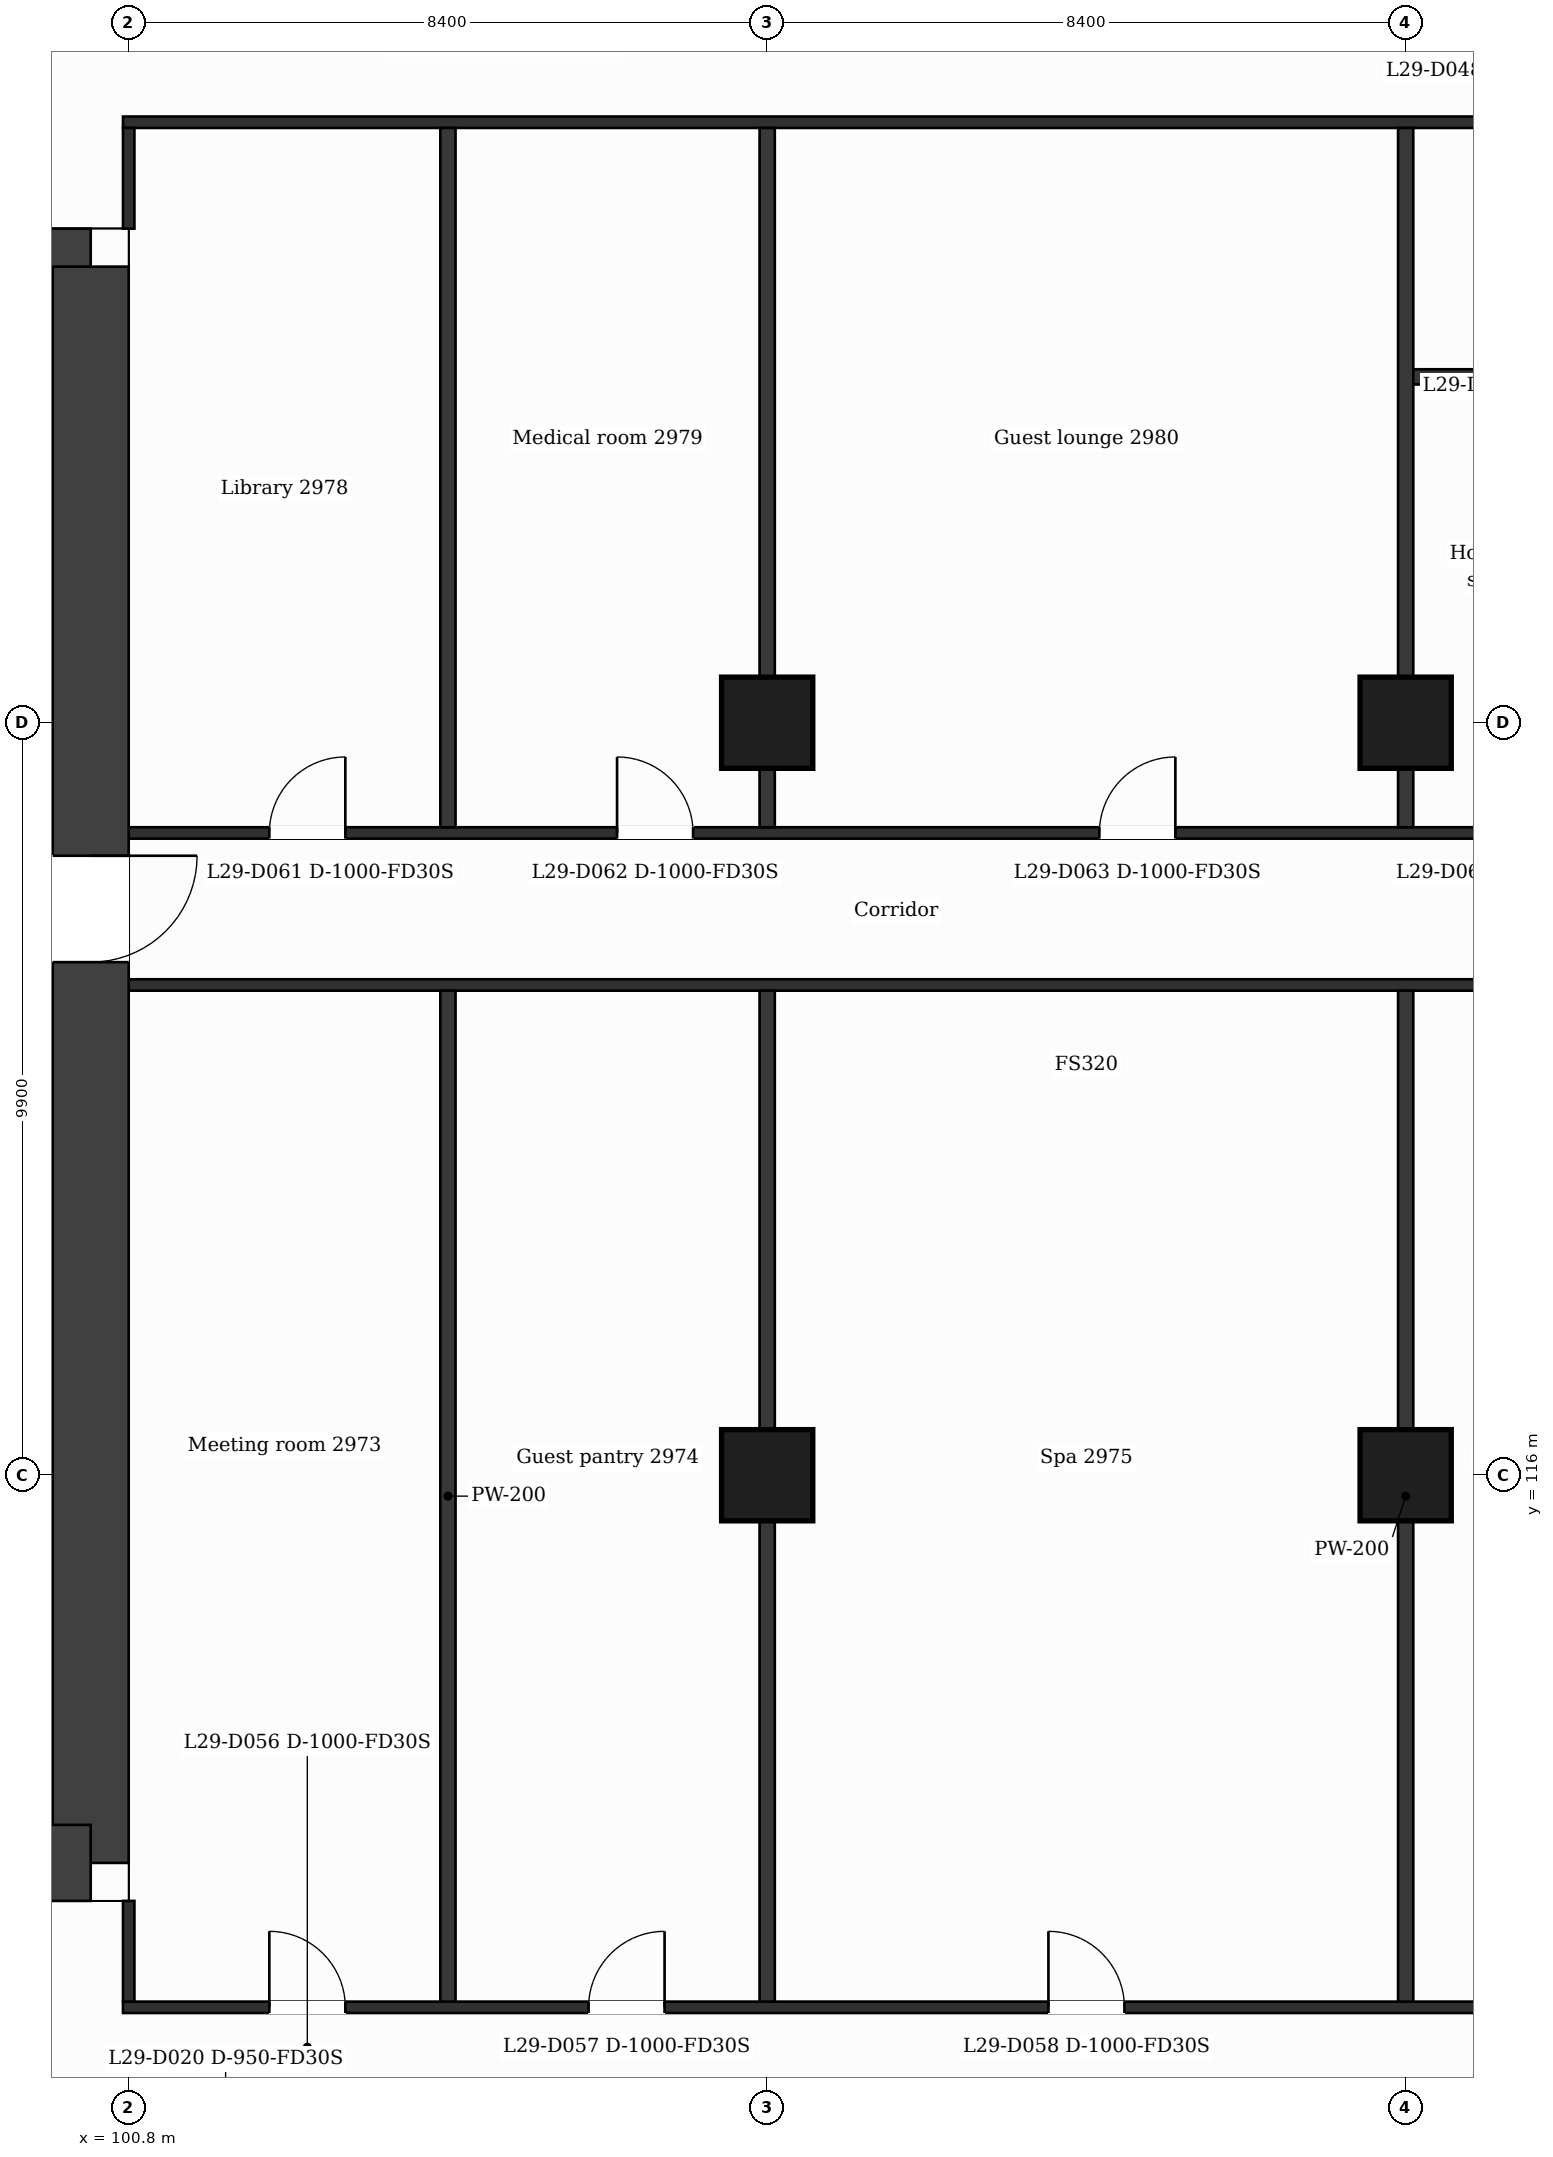
"""IFC4 building model, lengths in metres.
Left out: names, types, materials, properties, quantities, classifications, styles, units other than length and angle.
Written with IfcOpenShell. Run it as: python <this file> out.ifc"""

import sys

from ifc_helpers import new_model, si_unit, direction, frame, frame_2d, origin, origin_2d, place, context, subcontext, project, spatial, rectangle, extrude, element, fill, save


model = new_model("IFC4")
c1 = context("Model", 3, precision=1e-05, world=origin(), true_north=direction((0.0, 1.0)))
c2 = subcontext(c1, "Body", "Model", "MODEL_VIEW")
j1 = project(units=[si_unit("LENGTHUNIT", "METRE"), si_unit("PLANEANGLEUNIT", "RADIAN")], contexts=[c1])
p1 = place(None, origin())
s1 = spatial("IfcSite", under=j1, at=p1, CompositionType="ELEMENT")
p2 = place(p1, origin())
s2 = spatial("IfcBuilding", under=s1, at=p2, CompositionType="ELEMENT")
p3 = place(p2, frame((0.0, 0.0, 124.3)))
s3 = spatial("IfcBuildingStorey", under=s2, at=p3, CompositionType="ELEMENT", Elevation=124.3)
p4 = place(p3, frame((89.068, 131.9, 0.0), z_axis=(0.0, 0.0, 1.0), x_axis=(1.0, 0.0, 0.0)))
e1 = element("IfcWall", 1, at=p4, inside=s3, PredefinedType="SHEAR", context=c2, shape_type="SweptSolid", body=[
    extrude(rectangle(XDim=11.232, YDim=1.0, at=frame_2d((5.616, 0.0))), origin(), (0.0, 0.0, 1.0), 3.7),
])
p5 = place(p4, frame((6.646, 0.0, 0.0)))
e2 = element("IfcOpeningElement", 2, at=p5, cuts=e1, PredefinedType="OPENING", context=c2, shape_type="SweptSolid", body=[
    extrude(rectangle(XDim=1.2, YDim=2.1, at=frame_2d((0.6, 1.05))), frame((0.0, 0.51, 0.0), z_axis=(0.0, -1.0, 0.0), x_axis=(1.0, 0.0, 0.0)), (0.0, 0.0, 1.0), 1.02),
])
p6 = place(p3, frame((100.3, 131.9, 0.0), z_axis=(0.0, 0.0, 1.0), x_axis=(0.0, -1.0, 0.0)))
e3 = element("IfcWall", 3, at=p6, inside=s3, PredefinedType="SHEAR", context=c2, shape_type="SweptSolid", body=[
    extrude(rectangle(XDim=21.0, YDim=1.0, at=frame_2d((10.5, 0.0))), origin(), (0.0, 0.0, 1.0), 3.7),
])
p7 = place(p6, frame((7.75, 0.0, 0.0)))
e4 = element("IfcOpeningElement", 4, at=p7, cuts=e3, PredefinedType="OPENING", context=c2, shape_type="SweptSolid", body=[
    extrude(rectangle(XDim=1.4, YDim=2.1, at=frame_2d((0.7, 1.05))), frame((0.0, 0.51, 0.0), z_axis=(0.0, -1.0, 0.0), x_axis=(1.0, 0.0, 0.0)), (0.0, 0.0, 1.0), 1.02),
])
p8 = place(p3, frame((100.3, 110.9, 0.0), z_axis=(0.0, 0.0, 1.0), x_axis=(-1.0, 0.0, 0.0)))
e5 = element("IfcWall", 5, at=p8, inside=s3, PredefinedType="SHEAR", context=c2, shape_type="SweptSolid", body=[
    extrude(rectangle(XDim=14.059, YDim=1.0, at=frame_2d((7.03, 0.0))), origin(), (0.0, 0.0, 1.0), 3.7),
])
p9 = place(p8, frame((5.802, 0.0, 0.0)))
e6 = element("IfcOpeningElement", 6, at=p9, cuts=e5, PredefinedType="OPENING", context=c2, shape_type="SweptSolid", body=[
    extrude(rectangle(XDim=1.4, YDim=2.1, at=frame_2d((0.7, 1.05))), frame((0.0, 0.51, 0.0), z_axis=(0.0, -1.0, 0.0), x_axis=(1.0, 0.0, 0.0)), (0.0, 0.0, 1.0), 1.02),
])
p10 = place(p3, frame((94.9, 116.5, 0.0), z_axis=(0.0, 0.0, 1.0), x_axis=(1.0, 0.0, 0.0)))
e7 = element("IfcWall", 7, at=p10, inside=s3, PredefinedType="SHEAR", context=c2, shape_type="SweptSolid", body=[
    extrude(rectangle(XDim=4.9, YDim=1.0, at=frame_2d((2.45, 0.0))), origin(), (0.0, 0.0, 1.0), 3.7),
])
for number, where, z_axis, x_axis in (
    (8, (109.2, 116.0, 0.0), (0.0, 0.0, 1.0), (1.0, 0.0, 0.0)),
    (9, (117.6, 116.0, 0.0), (0.0, 0.0, 1.0), (1.0, 0.0, 0.0)),
    (10, (109.2, 125.9, 0.0), (0.0, 0.0, 1.0), (1.0, 0.0, 0.0)),
    (11, (117.6, 125.9, 0.0), (0.0, 0.0, 1.0), (1.0, 0.0, 0.0)),
):
    element("IfcColumn", number, at=place(p3, frame(where, z_axis=z_axis, x_axis=x_axis)), inside=s3, PredefinedType="COLUMN", context=c2, shape_type="SweptSolid", body=[
        extrude(rectangle(XDim=1.2, YDim=1.2, at=origin_2d()), origin(), (0.0, 0.0, 1.0), 3.7),
    ])
p11 = place(p3, frame((100.725, 109.0, 0.0), z_axis=(0.0, 0.0, 1.0), x_axis=(1.0, 0.0, 0.0)))
e12 = element("IfcWall", 12, at=p11, inside=s3, PredefinedType="PARTITIONING", context=c2, shape_type="SweptSolid", body=[
    extrude(rectangle(XDim=25.35, YDim=0.15, at=frame_2d((12.675, 0.0))), origin(), (0.0, 0.0, 1.0), 3.38),
])
p12 = place(p11, frame((1.925, 0.0, 0.0)))
e13 = element("IfcOpeningElement", 13, at=p12, cuts=e12, PredefinedType="OPENING", context=c2, shape_type="SweptSolid", body=[
    extrude(rectangle(XDim=1.0, YDim=2.1, at=frame_2d((0.5, 1.05))), frame((0.0, 0.085, 0.0), z_axis=(0.0, -1.0, 0.0), x_axis=(1.0, 0.0, 0.0)), (0.0, 0.0, 1.0), 0.17),
])
p13 = place(p11, frame((6.125, 0.0, 0.0)))
e14 = element("IfcOpeningElement", 14, at=p13, cuts=e12, PredefinedType="OPENING", context=c2, shape_type="SweptSolid", body=[
    extrude(rectangle(XDim=1.0, YDim=2.1, at=frame_2d((0.5, 1.05))), frame((0.0, 0.085, 0.0), z_axis=(0.0, -1.0, 0.0), x_axis=(1.0, 0.0, 0.0)), (0.0, 0.0, 1.0), 0.17),
])
p14 = place(p11, frame((12.175, 0.0, 0.0)))
e15 = element("IfcOpeningElement", 15, at=p14, cuts=e12, PredefinedType="OPENING", context=c2, shape_type="SweptSolid", body=[
    extrude(rectangle(XDim=1.0, YDim=2.1, at=frame_2d((0.5, 1.05))), frame((0.0, 0.085, 0.0), z_axis=(0.0, -1.0, 0.0), x_axis=(1.0, 0.0, 0.0)), (0.0, 0.0, 1.0), 0.17),
])
p15 = place(p11, frame((19.1, 0.0, 0.0)))
e16 = element("IfcOpeningElement", 16, at=p15, cuts=e12, PredefinedType="OPENING", context=c2, shape_type="SweptSolid", body=[
    extrude(rectangle(XDim=1.0, YDim=2.1, at=frame_2d((0.5, 1.05))), frame((0.0, 0.085, 0.0), z_axis=(0.0, -1.0, 0.0), x_axis=(1.0, 0.0, 0.0)), (0.0, 0.0, 1.0), 0.17),
])
p16 = place(p11, frame((22.05, 0.0, 0.0)))
e17 = element("IfcOpeningElement", 17, at=p16, cuts=e12, PredefinedType="OPENING", context=c2, shape_type="SweptSolid", body=[
    extrude(rectangle(XDim=1.0, YDim=2.1, at=frame_2d((0.5, 1.05))), frame((0.0, 0.085, 0.0), z_axis=(0.0, -1.0, 0.0), x_axis=(1.0, 0.0, 0.0)), (0.0, 0.0, 1.0), 0.17),
])
for number, where, z_axis, x_axis in (
    (18, (95.227, 117.2, 0.0), (0.0, 0.0, 1.0), (1.0, 0.0, 0.0)),
    (19, (95.227, 118.8, 0.0), (0.0, 0.0, 1.0), (1.0, 0.0, 0.0)),
):
    element("IfcWall", number, at=place(p3, frame(where, z_axis=z_axis, x_axis=x_axis)), inside=s3, PredefinedType="PARTITIONING", context=c2, shape_type="SweptSolid", body=[
        extrude(rectangle(XDim=4.573, YDim=0.2, at=frame_2d((2.287, 0.0))), origin(), (0.0, 0.0, 1.0), 3.38),
    ])
p17 = place(p3, frame((95.227, 122.1, 0.0), z_axis=(0.0, 0.0, 1.0), x_axis=(1.0, 0.0, 0.0)))
e20 = element("IfcWall", 20, at=p17, inside=s3, PredefinedType="PARTITIONING", context=c2, shape_type="SweptSolid", body=[
    extrude(rectangle(XDim=4.573, YDim=0.2, at=frame_2d((2.287, 0.0))), origin(), (0.0, 0.0, 1.0), 3.38),
])
p18 = place(p17, frame((2.134, 0.0, 0.0)))
e21 = element("IfcOpeningElement", 21, at=p18, cuts=e20, PredefinedType="OPENING", context=c2, shape_type="SweptSolid", body=[
    extrude(rectangle(XDim=0.9, YDim=2.1, at=frame_2d((0.45, 1.05))), frame((0.0, 0.11, 0.0), z_axis=(0.0, -1.0, 0.0), x_axis=(1.0, 0.0, 0.0)), (0.0, 0.0, 1.0), 0.22),
])
p19 = place(p3, frame((100.8, 122.45, 0.0), z_axis=(0.0, 0.0, 1.0), x_axis=(1.0, 0.0, 0.0)))
e22 = element("IfcWall", 22, at=p19, inside=s3, PredefinedType="PARTITIONING", context=c2, shape_type="SweptSolid", body=[
    extrude(rectangle(XDim=25.2, YDim=0.15, at=frame_2d((12.6, 0.0))), origin(), (0.0, 0.0, 1.0), 3.38),
])
p20 = place(p3, frame((100.8, 124.45, 0.0), z_axis=(0.0, 0.0, 1.0), x_axis=(1.0, 0.0, 0.0)))
e23 = element("IfcWall", 23, at=p20, inside=s3, PredefinedType="PARTITIONING", context=c2, shape_type="SweptSolid", body=[
    extrude(rectangle(XDim=25.2, YDim=0.15, at=frame_2d((12.6, 0.0))), origin(), (0.0, 0.0, 1.0), 3.38),
])
p21 = place(p20, frame((1.85, 0.0, 0.0)))
e24 = element("IfcOpeningElement", 24, at=p21, cuts=e23, PredefinedType="OPENING", context=c2, shape_type="SweptSolid", body=[
    extrude(rectangle(XDim=1.0, YDim=2.1, at=frame_2d((0.5, 1.05))), frame((0.0, 0.085, 0.0), z_axis=(0.0, -1.0, 0.0), x_axis=(1.0, 0.0, 0.0)), (0.0, 0.0, 1.0), 0.17),
])
p22 = place(p20, frame((6.425, 0.0, 0.0)))
e25 = element("IfcOpeningElement", 25, at=p22, cuts=e23, PredefinedType="OPENING", context=c2, shape_type="SweptSolid", body=[
    extrude(rectangle(XDim=1.0, YDim=2.1, at=frame_2d((0.5, 1.05))), frame((0.0, 0.085, 0.0), z_axis=(0.0, -1.0, 0.0), x_axis=(1.0, 0.0, 0.0)), (0.0, 0.0, 1.0), 0.17),
])
p23 = place(p20, frame((12.77, 0.0, 0.0)))
e26 = element("IfcOpeningElement", 26, at=p23, cuts=e23, PredefinedType="OPENING", context=c2, shape_type="SweptSolid", body=[
    extrude(rectangle(XDim=1.0, YDim=2.1, at=frame_2d((0.5, 1.05))), frame((0.0, 0.085, 0.0), z_axis=(0.0, -1.0, 0.0), x_axis=(1.0, 0.0, 0.0)), (0.0, 0.0, 1.0), 0.17),
])
p24 = place(p20, frame((17.8, 0.0, 0.0)))
e27 = element("IfcOpeningElement", 27, at=p24, cuts=e23, PredefinedType="OPENING", context=c2, shape_type="SweptSolid", body=[
    extrude(rectangle(XDim=1.0, YDim=2.1, at=frame_2d((0.5, 1.05))), frame((0.0, 0.085, 0.0), z_axis=(0.0, -1.0, 0.0), x_axis=(1.0, 0.0, 0.0)), (0.0, 0.0, 1.0), 0.17),
])
p25 = place(p20, frame((22.85, 0.0, 0.0)))
e28 = element("IfcOpeningElement", 28, at=p25, cuts=e23, PredefinedType="OPENING", context=c2, shape_type="SweptSolid", body=[
    extrude(rectangle(XDim=1.0, YDim=2.1, at=frame_2d((0.5, 1.05))), frame((0.0, 0.085, 0.0), z_axis=(0.0, -1.0, 0.0), x_axis=(1.0, 0.0, 0.0)), (0.0, 0.0, 1.0), 0.17),
])
p26 = place(p3, frame((117.6, 130.45, 0.0), z_axis=(0.0, 0.0, 1.0), x_axis=(1.0, 0.0, 0.0)))
e29 = element("IfcWall", 29, at=p26, inside=s3, PredefinedType="PARTITIONING", context=c2, shape_type="SweptSolid", body=[
    extrude(rectangle(XDim=3.1, YDim=0.2, at=frame_2d((1.55, 0.0))), origin(), (0.0, 0.0, 1.0), 3.38),
])
p27 = place(p3, frame((100.725, 133.8, 0.0), z_axis=(0.0, 0.0, 1.0), x_axis=(1.0, 0.0, 0.0)))
e30 = element("IfcWall", 30, at=p27, inside=s3, PredefinedType="PARTITIONING", context=c2, shape_type="SweptSolid", body=[
    extrude(rectangle(XDim=25.35, YDim=0.15, at=frame_2d((12.675, 0.0))), origin(), (0.0, 0.0, 1.0), 3.38),
])
p28 = place(p27, frame((18.225, 0.0, 0.0)))
e31 = element("IfcOpeningElement", 31, at=p28, cuts=e30, PredefinedType="OPENING", context=c2, shape_type="SweptSolid", body=[
    extrude(rectangle(XDim=1.0, YDim=2.1, at=frame_2d((0.5, 1.05))), frame((0.0, 0.085, 0.0), z_axis=(0.0, -1.0, 0.0), x_axis=(1.0, 0.0, 0.0)), (0.0, 0.0, 1.0), 0.17),
])
p29 = place(p3, frame((100.8, 109.075, 0.0), z_axis=(0.0, 0.0, 1.0), x_axis=(0.0, 1.0, 0.0)))
e32 = element("IfcWall", 32, at=p29, inside=s3, PredefinedType="PARTITIONING", context=c2, shape_type="SweptSolid", body=[
    extrude(rectangle(XDim=1.325, YDim=0.15, at=frame_2d((0.663, 0.0))), origin(), (0.0, 0.0, 1.0), 3.38),
])
p30 = place(p3, frame((100.8, 132.4, 0.0), z_axis=(0.0, 0.0, 1.0), x_axis=(0.0, 1.0, 0.0)))
e33 = element("IfcWall", 33, at=p30, inside=s3, PredefinedType="PARTITIONING", context=c2, shape_type="SweptSolid", body=[
    extrude(rectangle(XDim=1.325, YDim=0.15, at=frame_2d((0.663, 0.0))), origin(), (0.0, 0.0, 1.0), 3.38),
])
p31 = place(p3, frame((105.0, 109.075, 0.0), z_axis=(0.0, 0.0, 1.0), x_axis=(0.0, 1.0, 0.0)))
e34 = element("IfcWall", 34, at=p31, inside=s3, PredefinedType="PARTITIONING", context=c2, shape_type="SweptSolid", body=[
    extrude(rectangle(XDim=13.3, YDim=0.2, at=frame_2d((6.65, 0.0))), origin(), (0.0, 0.0, 1.0), 3.38),
])
p32 = place(p3, frame((105.0, 124.525, 0.0), z_axis=(0.0, 0.0, 1.0), x_axis=(0.0, 1.0, 0.0)))
e35 = element("IfcWall", 35, at=p32, inside=s3, PredefinedType="PARTITIONING", context=c2, shape_type="SweptSolid", body=[
    extrude(rectangle(XDim=9.2, YDim=0.2, at=frame_2d((4.6, 0.0))), origin(), (0.0, 0.0, 1.0), 3.38),
])
p33 = place(p3, frame((109.2, 109.075, 0.0), z_axis=(0.0, 0.0, 1.0), x_axis=(0.0, 1.0, 0.0)))
e36 = element("IfcWall", 36, at=p33, inside=s3, PredefinedType="PARTITIONING", context=c2, shape_type="SweptSolid", body=[
    extrude(rectangle(XDim=13.3, YDim=0.2, at=frame_2d((6.65, 0.0))), origin(), (0.0, 0.0, 1.0), 3.38),
])
p34 = place(p3, frame((109.2, 124.525, 0.0), z_axis=(0.0, 0.0, 1.0), x_axis=(0.0, 1.0, 0.0)))
e37 = element("IfcWall", 37, at=p34, inside=s3, PredefinedType="PARTITIONING", context=c2, shape_type="SweptSolid", body=[
    extrude(rectangle(XDim=9.2, YDim=0.2, at=frame_2d((4.6, 0.0))), origin(), (0.0, 0.0, 1.0), 3.38),
])
p35 = place(p3, frame((117.6, 109.075, 0.0), z_axis=(0.0, 0.0, 1.0), x_axis=(0.0, 1.0, 0.0)))
e38 = element("IfcWall", 38, at=p35, inside=s3, PredefinedType="PARTITIONING", context=c2, shape_type="SweptSolid", body=[
    extrude(rectangle(XDim=13.3, YDim=0.2, at=frame_2d((6.65, 0.0))), origin(), (0.0, 0.0, 1.0), 3.38),
])
p36 = place(p3, frame((117.6, 124.525, 0.0), z_axis=(0.0, 0.0, 1.0), x_axis=(0.0, 1.0, 0.0)))
e39 = element("IfcWall", 39, at=p36, inside=s3, PredefinedType="PARTITIONING", context=c2, shape_type="SweptSolid", body=[
    extrude(rectangle(XDim=9.2, YDim=0.2, at=frame_2d((4.6, 0.0))), origin(), (0.0, 0.0, 1.0), 3.38),
])
p37 = place(p12, origin())
e40 = element("IfcDoor", 40, at=p37, inside=s3, OperationType="SINGLE_SWING_LEFT", PredefinedType="DOOR", context=c2, shape_type="SweptSolid", body=[
    extrude(rectangle(XDim=1.0, YDim=2.1, at=frame_2d((0.5, 1.05))), frame((0.0, 0.025, 0.0), z_axis=(0.0, -1.0, 0.0), x_axis=(1.0, 0.0, 0.0)), (0.0, 0.0, 1.0), 0.05),
])
fill(e13, e40)
p38 = place(p13, origin())
e41 = element("IfcDoor", 41, at=p38, inside=s3, OperationType="SINGLE_SWING_RIGHT", PredefinedType="DOOR", context=c2, shape_type="SweptSolid", body=[
    extrude(rectangle(XDim=1.0, YDim=2.1, at=frame_2d((0.5, 1.05))), frame((0.0, 0.025, 0.0), z_axis=(0.0, -1.0, 0.0), x_axis=(1.0, 0.0, 0.0)), (0.0, 0.0, 1.0), 0.05),
])
fill(e14, e41)
p39 = place(p14, origin())
e42 = element("IfcDoor", 42, at=p39, inside=s3, OperationType="SINGLE_SWING_LEFT", PredefinedType="DOOR", context=c2, shape_type="SweptSolid", body=[
    extrude(rectangle(XDim=1.0, YDim=2.1, at=frame_2d((0.5, 1.05))), frame((0.0, 0.025, 0.0), z_axis=(0.0, -1.0, 0.0), x_axis=(1.0, 0.0, 0.0)), (0.0, 0.0, 1.0), 0.05),
])
fill(e15, e42)
p40 = place(p21, origin())
e43 = element("IfcDoor", 43, at=p40, inside=s3, OperationType="SINGLE_SWING_RIGHT", PredefinedType="DOOR", context=c2, shape_type="SweptSolid", body=[
    extrude(rectangle(XDim=1.0, YDim=2.1, at=frame_2d((0.5, 1.05))), frame((0.0, 0.025, 0.0), z_axis=(0.0, -1.0, 0.0), x_axis=(1.0, 0.0, 0.0)), (0.0, 0.0, 1.0), 0.05),
])
fill(e24, e43)
p41 = place(p22, origin())
e44 = element("IfcDoor", 44, at=p41, inside=s3, OperationType="SINGLE_SWING_LEFT", PredefinedType="DOOR", context=c2, shape_type="SweptSolid", body=[
    extrude(rectangle(XDim=1.0, YDim=2.1, at=frame_2d((0.5, 1.05))), frame((0.0, 0.025, 0.0), z_axis=(0.0, -1.0, 0.0), x_axis=(1.0, 0.0, 0.0)), (0.0, 0.0, 1.0), 0.05),
])
fill(e25, e44)
p42 = place(p23, origin())
e45 = element("IfcDoor", 45, at=p42, inside=s3, OperationType="SINGLE_SWING_RIGHT", PredefinedType="DOOR", context=c2, shape_type="SweptSolid", body=[
    extrude(rectangle(XDim=1.0, YDim=2.1, at=frame_2d((0.5, 1.05))), frame((0.0, 0.025, 0.0), z_axis=(0.0, -1.0, 0.0), x_axis=(1.0, 0.0, 0.0)), (0.0, 0.0, 1.0), 0.05),
])
fill(e26, e45)
p43 = place(p7, origin())
e46 = element("IfcDoor", 46, at=p43, inside=s3, OperationType="SINGLE_SWING_LEFT", PredefinedType="DOOR", context=c2, shape_type="SweptSolid", body=[
    extrude(rectangle(XDim=1.4, YDim=2.1, at=frame_2d((0.7, 1.05))), frame((0.0, 0.025, 0.0), z_axis=(0.0, -1.0, 0.0), x_axis=(1.0, 0.0, 0.0)), (0.0, 0.0, 1.0), 0.05),
])
fill(e4, e46)
save(model, sys.argv[1])
